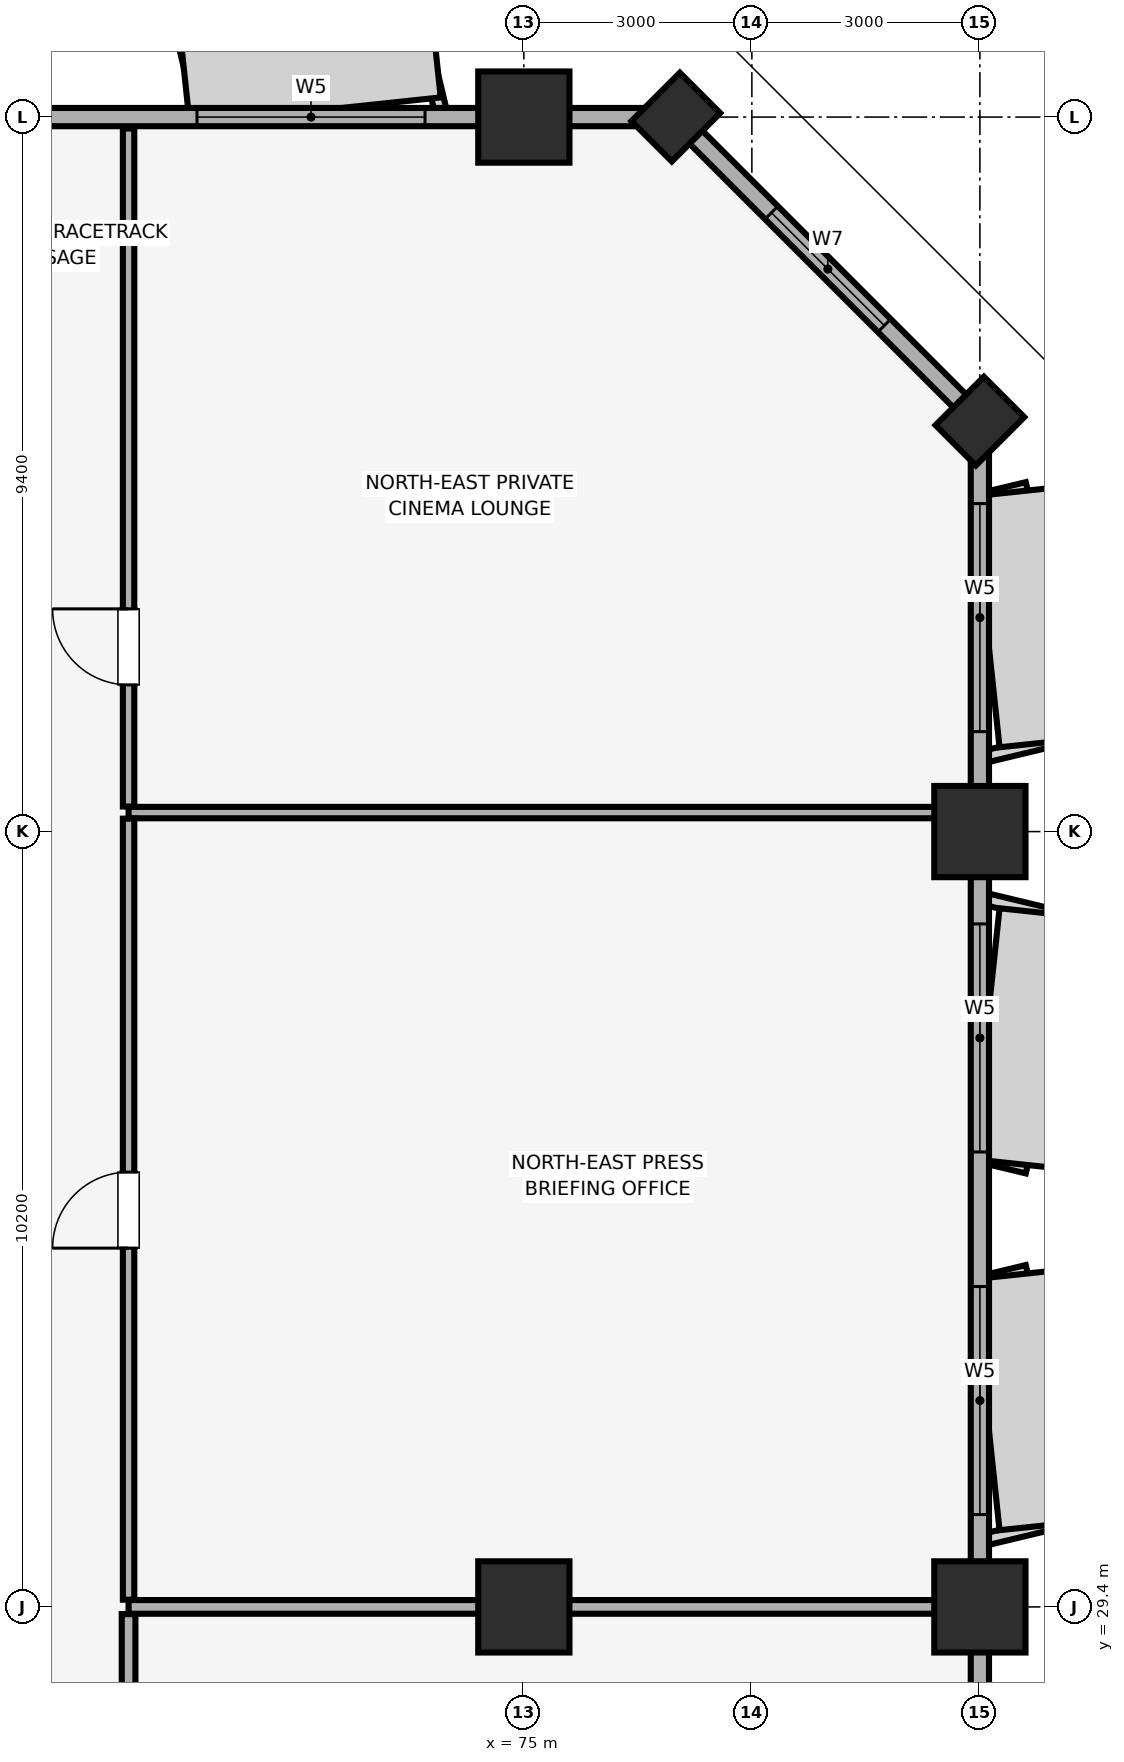
"""IFC4 building model, lengths in metres.
Left out: names, types, materials, properties, quantities, classifications, styles, units other than length and angle.
Written with IfcOpenShell. Run it as: python <this file> out.ifc"""

import sys

from ifc_helpers import new_model, si_unit, direction, frame, frame_2d, origin, origin_2d, place, context, subcontext, project, spatial, rectangle, extrude, element, fill, save


model = new_model("IFC4")
c1 = context("Model", 3, precision=1e-05, world=origin(), true_north=direction((0.0, 1.0)))
c2 = subcontext(c1, "Body", "Model", "MODEL_VIEW")
j1 = project(units=[si_unit("LENGTHUNIT", "METRE"), si_unit("PLANEANGLEUNIT", "RADIAN")], contexts=[c1])
p1 = place(None, origin())
s1 = spatial("IfcSite", under=j1, at=p1, CompositionType="ELEMENT")
p2 = place(p1, origin())
s2 = spatial("IfcBuilding", under=s1, at=p2, CompositionType="ELEMENT")
p3 = place(p2, frame((0.0, 0.0, 180.95)))
s3 = spatial("IfcBuildingStorey", under=s2, at=p3, CompositionType="ELEMENT", Elevation=180.95)
for number, where, z_axis, x_axis in (
    (1, (81.0, 29.4, 0.0), (0.0, 0.0, 1.0), (1.0, 0.0, 0.0)),
    (2, (81.0, 39.6, 0.0), (0.0, 0.0, 1.0), (1.0, 0.0, 0.0)),
):
    element("IfcColumn", number, at=place(p3, frame(where, z_axis=z_axis, x_axis=x_axis)), inside=s3, PredefinedType="COLUMN", context=c2, shape_type="SweptSolid", body=[
        extrude(rectangle(XDim=1.2, YDim=1.2, at=origin_2d()), origin(), (0.0, 0.0, 1.0), 3.45),
    ])
for number, where, z_axis, x_axis in (
    (3, (81.0, 45.0, 0.0), (0.0, 0.0, 1.0), (0.707, 0.707, 0.0)),
    (4, (77.0, 49.0, 0.0), (0.0, 0.0, 1.0), (0.707, 0.707, 0.0)),
):
    element("IfcColumn", number, at=place(p3, frame(where, z_axis=z_axis, x_axis=x_axis)), inside=s3, PredefinedType="PILASTER", context=c2, shape_type="SweptSolid", body=[
        extrude(rectangle(XDim=0.9, YDim=0.75, at=origin_2d()), origin(), (0.0, 0.0, 1.0), 3.45),
    ])
for number, where, z_axis, x_axis in (
    (5, (75.0, 29.4, 0.0), (0.0, 0.0, 1.0), (1.0, 0.0, 0.0)),
    (6, (75.0, 49.0, 0.0), (0.0, 0.0, 1.0), (1.0, 0.0, 0.0)),
):
    element("IfcColumn", number, at=place(p3, frame(where, z_axis=z_axis, x_axis=x_axis)), inside=s3, PredefinedType="COLUMN", context=c2, shape_type="SweptSolid", body=[
        extrude(rectangle(XDim=1.2, YDim=1.2, at=origin_2d()), origin(), (0.0, 0.0, 1.0), 3.45),
    ])
p4 = place(p3, frame((81.0, 7.0, 0.0), z_axis=(0.0, 0.0, 1.0), x_axis=(0.0, 1.0, 0.0)))
e7 = element("IfcWall", 7, at=p4, inside=s3, PredefinedType="SOLIDWALL", context=c2, shape_type="SweptSolid", body=[
    extrude(rectangle(XDim=38.0, YDim=0.24, at=frame_2d((19.0, 0.0))), origin(), (0.0, 0.0, 1.0), 2.65),
])
p5 = place(p4, frame((2.5, 0.0, 0.85)))
e8 = element("IfcOpeningElement", 8, at=p5, cuts=e7, PredefinedType="OPENING", context=c2, shape_type="SweptSolid", body=[
    extrude(rectangle(XDim=3.0, YDim=1.5, at=frame_2d((1.5, 0.75))), frame((0.0, 0.13, 0.0), z_axis=(0.0, -1.0, 0.0), x_axis=(1.0, 0.0, 0.0)), (0.0, 0.0, 1.0), 0.26),
])
p6 = place(p4, frame((10.45, 0.0, 0.85)))
e9 = element("IfcOpeningElement", 9, at=p6, cuts=e7, PredefinedType="OPENING", context=c2, shape_type="SweptSolid", body=[
    extrude(rectangle(XDim=3.0, YDim=1.5, at=frame_2d((1.5, 0.75))), frame((0.0, 0.13, 0.0), z_axis=(0.0, -1.0, 0.0), x_axis=(1.0, 0.0, 0.0)), (0.0, 0.0, 1.0), 0.26),
])
p7 = place(p4, frame((17.25, 0.0, 0.85)))
e10 = element("IfcOpeningElement", 10, at=p7, cuts=e7, PredefinedType="OPENING", context=c2, shape_type="SweptSolid", body=[
    extrude(rectangle(XDim=3.0, YDim=1.5, at=frame_2d((1.5, 0.75))), frame((0.0, 0.13, 0.0), z_axis=(0.0, -1.0, 0.0), x_axis=(1.0, 0.0, 0.0)), (0.0, 0.0, 1.0), 0.26),
])
p8 = place(p4, frame((23.615, 0.0, 0.85)))
e11 = element("IfcOpeningElement", 11, at=p8, cuts=e7, PredefinedType="OPENING", context=c2, shape_type="SweptSolid", body=[
    extrude(rectangle(XDim=3.0, YDim=1.5, at=frame_2d((1.5, 0.75))), frame((0.0, 0.13, 0.0), z_axis=(0.0, -1.0, 0.0), x_axis=(1.0, 0.0, 0.0)), (0.0, 0.0, 1.0), 0.26),
])
p9 = place(p4, frame((28.385, 0.0, 0.85)))
e12 = element("IfcOpeningElement", 12, at=p9, cuts=e7, PredefinedType="OPENING", context=c2, shape_type="SweptSolid", body=[
    extrude(rectangle(XDim=3.0, YDim=1.5, at=frame_2d((1.5, 0.75))), frame((0.0, 0.13, 0.0), z_axis=(0.0, -1.0, 0.0), x_axis=(1.0, 0.0, 0.0)), (0.0, 0.0, 1.0), 0.26),
])
p10 = place(p4, frame((33.915, 0.0, 0.85)))
e13 = element("IfcOpeningElement", 13, at=p10, cuts=e7, PredefinedType="OPENING", context=c2, shape_type="SweptSolid", body=[
    extrude(rectangle(XDim=3.0, YDim=1.5, at=frame_2d((1.5, 0.75))), frame((0.0, 0.13, 0.0), z_axis=(0.0, -1.0, 0.0), x_axis=(1.0, 0.0, 0.0)), (0.0, 0.0, 1.0), 0.26),
])
p11 = place(p3, frame((81.0, 45.0, 0.0), z_axis=(0.0, 0.0, 1.0), x_axis=(-0.707106781187, 0.707106781187, 0.0)))
e14 = element("IfcWall", 14, at=p11, inside=s3, PredefinedType="SOLIDWALL", context=c2, shape_type="SweptSolid", body=[
    extrude(rectangle(XDim=5.657, YDim=0.24, at=frame_2d((2.828, 0.0))), origin(), (0.0, 0.0, 1.0), 2.65),
])
p12 = place(p11, frame((1.778, 0.0, 0.85)))
e15 = element("IfcOpeningElement", 15, at=p12, cuts=e14, PredefinedType="OPENING", context=c2, shape_type="SweptSolid", body=[
    extrude(rectangle(XDim=2.1, YDim=1.6, at=frame_2d((1.05, 0.8))), frame((0.0, 0.13, 0.0), z_axis=(0.0, -1.0, 0.0), x_axis=(1.0, 0.0, 0.0)), (0.0, 0.0, 1.0), 0.26),
])
p13 = place(p3, frame((77.0, 49.0, 0.0), z_axis=(0.0, 0.0, 1.0), x_axis=(-1.0, 0.0, 0.0)))
e16 = element("IfcWall", 16, at=p13, inside=s3, PredefinedType="SOLIDWALL", context=c2, shape_type="SweptSolid", body=[
    extrude(rectangle(XDim=70.0, YDim=0.24, at=frame_2d((35.0, 0.0))), origin(), (0.0, 0.0, 1.0), 2.65),
])
p14 = place(p13, frame((63.7, 0.0, 0.85)))
e17 = element("IfcOpeningElement", 17, at=p14, cuts=e16, PredefinedType="OPENING", context=c2, shape_type="SweptSolid", body=[
    extrude(rectangle(XDim=3.0, YDim=1.5, at=frame_2d((1.5, 0.75))), frame((0.0, 0.13, 0.0), z_axis=(0.0, -1.0, 0.0), x_axis=(1.0, 0.0, 0.0)), (0.0, 0.0, 1.0), 0.26),
])
p15 = place(p13, frame((3.3, 0.0, 0.85)))
e18 = element("IfcOpeningElement", 18, at=p15, cuts=e16, PredefinedType="OPENING", context=c2, shape_type="SweptSolid", body=[
    extrude(rectangle(XDim=3.0, YDim=1.5, at=frame_2d((1.5, 0.75))), frame((0.0, 0.13, 0.0), z_axis=(0.0, -1.0, 0.0), x_axis=(1.0, 0.0, 0.0)), (0.0, 0.0, 1.0), 0.26),
])
p16 = place(p13, frame((49.465, 0.0, 0.9)))
e19 = element("IfcOpeningElement", 19, at=p16, cuts=e16, PredefinedType="OPENING", context=c2, shape_type="SweptSolid", body=[
    extrude(rectangle(XDim=1.5, YDim=1.4, at=frame_2d((0.75, 0.7))), frame((0.0, 0.13, 0.0), z_axis=(0.0, -1.0, 0.0), x_axis=(1.0, 0.0, 0.0)), (0.0, 0.0, 1.0), 0.26),
])
p17 = place(p13, frame((41.65, 0.0, 0.9)))
e20 = element("IfcOpeningElement", 20, at=p17, cuts=e16, PredefinedType="OPENING", context=c2, shape_type="SweptSolid", body=[
    extrude(rectangle(XDim=3.6, YDim=1.5, at=frame_2d((1.8, 0.75))), frame((0.0, 0.13, 0.0), z_axis=(0.0, -1.0, 0.0), x_axis=(1.0, 0.0, 0.0)), (0.0, 0.0, 1.0), 0.26),
])
p18 = place(p13, frame((28.25, 0.0, 0.9)))
e21 = element("IfcOpeningElement", 21, at=p18, cuts=e16, PredefinedType="OPENING", context=c2, shape_type="SweptSolid", body=[
    extrude(rectangle(XDim=1.5, YDim=1.4, at=frame_2d((0.75, 0.7))), frame((0.0, 0.13, 0.0), z_axis=(0.0, -1.0, 0.0), x_axis=(1.0, 0.0, 0.0)), (0.0, 0.0, 1.0), 0.26),
])
p19 = place(p13, frame((24.6, 0.0, 0.9)))
e22 = element("IfcOpeningElement", 22, at=p19, cuts=e16, PredefinedType="OPENING", context=c2, shape_type="SweptSolid", body=[
    extrude(rectangle(XDim=2.4, YDim=1.5, at=frame_2d((1.2, 0.75))), frame((0.0, 0.13, 0.0), z_axis=(0.0, -1.0, 0.0), x_axis=(1.0, 0.0, 0.0)), (0.0, 0.0, 1.0), 0.26),
])
p20 = place(p13, frame((20.235, 0.0, 0.9)))
e23 = element("IfcOpeningElement", 23, at=p20, cuts=e16, PredefinedType="OPENING", context=c2, shape_type="SweptSolid", body=[
    extrude(rectangle(XDim=2.4, YDim=1.5, at=frame_2d((1.2, 0.75))), frame((0.0, 0.13, 0.0), z_axis=(0.0, -1.0, 0.0), x_axis=(1.0, 0.0, 0.0)), (0.0, 0.0, 1.0), 0.26),
])
p21 = place(p3, frame((69.8, 29.4, 0.0), z_axis=(0.0, 0.0, 1.0), x_axis=(1.0, 0.0, 0.0)))
e24 = element("IfcWall", 24, at=p21, inside=s3, PredefinedType="PARTITIONING", context=c2, shape_type="SweptSolid", body=[
    extrude(rectangle(XDim=11.05, YDim=0.18, at=frame_2d((5.525, 0.0))), origin(), (0.0, 0.0, 1.0), 2.54),
])
p22 = place(p3, frame((69.8, 22.595, 0.0), z_axis=(0.0, 0.0, 1.0), x_axis=(0.0, 1.0, 0.0)))
e25 = element("IfcWall", 25, at=p22, inside=s3, PredefinedType="PARTITIONING", context=c2, shape_type="SweptSolid", body=[
    extrude(rectangle(XDim=6.71, YDim=0.18, at=frame_2d((3.355, 0.0))), origin(), (0.0, 0.0, 1.0), 3.45),
])
p23 = place(p22, frame((3.94, 0.0, 0.0)))
e26 = element("IfcOpeningElement", 26, at=p23, cuts=e25, PredefinedType="OPENING", context=c2, shape_type="SweptSolid", body=[
    extrude(rectangle(XDim=1.0, YDim=2.15, at=frame_2d((0.5, 1.075))), frame((0.0, 0.1, 0.0), z_axis=(0.0, -1.0, 0.0), x_axis=(1.0, 0.0, 0.0)), (0.0, 0.0, 1.0), 0.2),
])
p24 = place(p3, frame((69.8, 39.85, 0.0), z_axis=(0.0, 0.0, 1.0), x_axis=(1.0, 0.0, 0.0)))
e27 = element("IfcWall", 27, at=p24, inside=s3, PredefinedType="PARTITIONING", context=c2, shape_type="SweptSolid", body=[
    extrude(rectangle(XDim=11.05, YDim=0.15, at=frame_2d((5.525, 0.0))), origin(), (0.0, 0.0, 1.0), 3.45),
])
p25 = place(p3, frame((69.8, 29.495, 0.0), z_axis=(0.0, 0.0, 1.0), x_axis=(0.0, 1.0, 0.0)))
e28 = element("IfcWall", 28, at=p25, inside=s3, PredefinedType="PARTITIONING", context=c2, shape_type="SweptSolid", body=[
    extrude(rectangle(XDim=10.275, YDim=0.15, at=frame_2d((5.137, 0.0))), origin(), (0.0, 0.0, 1.0), 3.45),
])
p26 = place(p25, frame((4.625, 0.0, 0.0)))
e29 = element("IfcOpeningElement", 29, at=p26, cuts=e28, PredefinedType="OPENING", context=c2, shape_type="SweptSolid", body=[
    extrude(rectangle(XDim=1.0, YDim=2.15, at=frame_2d((0.5, 1.075))), frame((0.0, 0.085, 0.0), z_axis=(0.0, -1.0, 0.0), x_axis=(1.0, 0.0, 0.0)), (0.0, 0.0, 1.0), 0.17),
])
p27 = place(p3, frame((69.8, 39.93, 0.0), z_axis=(0.0, 0.0, 1.0), x_axis=(0.0, 1.0, 0.0)))
e30 = element("IfcWall", 30, at=p27, inside=s3, PredefinedType="PARTITIONING", context=c2, shape_type="SweptSolid", body=[
    extrude(rectangle(XDim=8.92, YDim=0.15, at=frame_2d((4.46, 0.0))), origin(), (0.0, 0.0, 1.0), 3.45),
])
p28 = place(p27, frame((1.6, 0.0, 0.0)))
e31 = element("IfcOpeningElement", 31, at=p28, cuts=e30, PredefinedType="OPENING", context=c2, shape_type="SweptSolid", body=[
    extrude(rectangle(XDim=1.0, YDim=2.15, at=frame_2d((0.5, 1.075))), frame((0.0, 0.085, 0.0), z_axis=(0.0, -1.0, 0.0), x_axis=(1.0, 0.0, 0.0)), (0.0, 0.0, 1.0), 0.17),
])
p29 = place(p12, origin())
e32 = element("IfcWindow", 32, at=p29, inside=s3, PartitioningType="SINGLE_PANEL", PredefinedType="WINDOW", context=c2, shape_type="SweptSolid", body=[
    extrude(rectangle(XDim=2.1, YDim=1.6, at=frame_2d((1.05, 0.8))), frame((0.0, 0.03, 0.0), z_axis=(0.0, -1.0, 0.0), x_axis=(1.0, 0.0, 0.0)), (0.0, 0.0, 1.0), 0.06),
])
fill(e15, e32)
p30 = place(p8, origin())
e33 = element("IfcWindow", 33, at=p30, inside=s3, PartitioningType="SINGLE_PANEL", PredefinedType="WINDOW", context=c2, shape_type="SweptSolid", body=[
    extrude(rectangle(XDim=3.0, YDim=1.5, at=frame_2d((1.5, 0.75))), frame((0.0, 0.03, 0.0), z_axis=(0.0, -1.0, 0.0), x_axis=(1.0, 0.0, 0.0)), (0.0, 0.0, 1.0), 0.06),
])
fill(e11, e33)
p31 = place(p9, origin())
e34 = element("IfcWindow", 34, at=p31, inside=s3, PartitioningType="SINGLE_PANEL", PredefinedType="WINDOW", context=c2, shape_type="SweptSolid", body=[
    extrude(rectangle(XDim=3.0, YDim=1.5, at=frame_2d((1.5, 0.75))), frame((0.0, 0.03, 0.0), z_axis=(0.0, -1.0, 0.0), x_axis=(1.0, 0.0, 0.0)), (0.0, 0.0, 1.0), 0.06),
])
fill(e12, e34)
p32 = place(p10, origin())
e35 = element("IfcWindow", 35, at=p32, inside=s3, PartitioningType="SINGLE_PANEL", PredefinedType="WINDOW", context=c2, shape_type="SweptSolid", body=[
    extrude(rectangle(XDim=3.0, YDim=1.5, at=frame_2d((1.5, 0.75))), frame((0.0, 0.03, 0.0), z_axis=(0.0, -1.0, 0.0), x_axis=(1.0, 0.0, 0.0)), (0.0, 0.0, 1.0), 0.06),
])
fill(e13, e35)
p33 = place(p15, origin())
e36 = element("IfcWindow", 36, at=p33, inside=s3, PartitioningType="SINGLE_PANEL", PredefinedType="WINDOW", context=c2, shape_type="SweptSolid", body=[
    extrude(rectangle(XDim=3.0, YDim=1.5, at=frame_2d((1.5, 0.75))), frame((0.0, 0.03, 0.0), z_axis=(0.0, -1.0, 0.0), x_axis=(1.0, 0.0, 0.0)), (0.0, 0.0, 1.0), 0.06),
])
fill(e18, e36)
p34 = place(p26, origin())
e37 = element("IfcDoor", 37, at=p34, inside=s3, OperationType="SINGLE_SWING_LEFT", PredefinedType="DOOR", context=c2, shape_type="SweptSolid", body=[
    extrude(rectangle(XDim=1.0, YDim=2.15, at=frame_2d((0.5, 1.075))), frame((0.0, 0.025, 0.0), z_axis=(0.0, -1.0, 0.0), x_axis=(1.0, 0.0, 0.0)), (0.0, 0.0, 1.0), 0.05),
])
fill(e29, e37)
p35 = place(p28, origin())
e38 = element("IfcDoor", 38, at=p35, inside=s3, OperationType="SINGLE_SWING_RIGHT", PredefinedType="DOOR", context=c2, shape_type="SweptSolid", body=[
    extrude(rectangle(XDim=1.0, YDim=2.15, at=frame_2d((0.5, 1.075))), frame((0.0, 0.025, 0.0), z_axis=(0.0, -1.0, 0.0), x_axis=(1.0, 0.0, 0.0)), (0.0, 0.0, 1.0), 0.05),
])
fill(e31, e38)
save(model, sys.argv[1])
